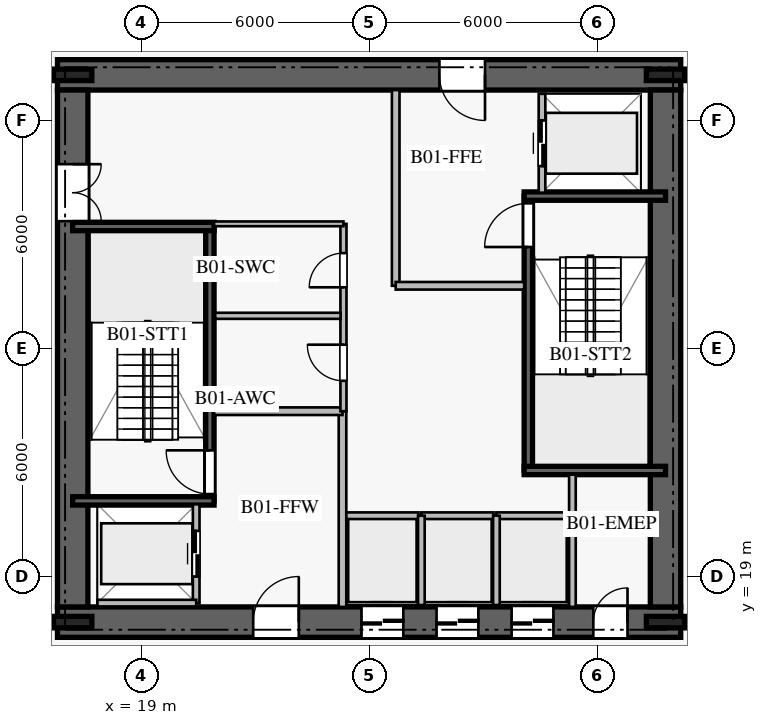
"""IFC4 building model, lengths in metres.
Left out: names, types, materials, properties, quantities, classifications, styles, units other than length and angle.
Written with IfcOpenShell. Run it as: python <this file> out.ifc"""

import sys

from ifc_helpers import new_model, si_unit, direction, frame, frame_2d, origin, origin_2d, place, context, subcontext, project, spatial, rectangle, i_section, extrude, element, fill, save


model = new_model("IFC4")
c1 = context("Model", 3, precision=1e-05, world=origin(), true_north=direction((0.0, 1.0)))
c2 = subcontext(c1, "Body", "Model", "MODEL_VIEW")
j1 = project(units=[si_unit("LENGTHUNIT", "METRE"), si_unit("PLANEANGLEUNIT", "RADIAN")], contexts=[c1])
p1 = place(None, origin())
s1 = spatial("IfcSite", under=j1, at=p1, CompositionType="ELEMENT")
p2 = place(p1, origin())
s2 = spatial("IfcBuilding", under=s1, at=p2, CompositionType="ELEMENT")
p3 = place(p2, frame((0.0, 0.0, -4.2)))
s3 = spatial("IfcBuildingStorey", under=s2, at=p3, CompositionType="ELEMENT", Elevation=-4.2)
p4 = place(p3, frame((16.8, 17.8, 0.0), z_axis=(0.0, 0.0, 1.0), x_axis=(1.0, 0.0, 0.0)))
e1 = element("IfcWall", 1, at=p4, inside=s3, PredefinedType="SHEAR", context=c2, shape_type="SweptSolid", body=[
    extrude(rectangle(XDim=16.4, YDim=0.8, at=frame_2d((8.2, 0.0))), origin(), (0.0, 0.0, 1.0), 3.88),
])
p5 = place(p4, frame((5.15, 0.0, 0.0)))
e2 = element("IfcOpeningElement", 2, at=p5, cuts=e1, PredefinedType="OPENING", context=c2, shape_type="SweptSolid", body=[
    extrude(rectangle(XDim=1.2, YDim=2.25, at=frame_2d((0.6, 1.125))), frame((0.0, 0.41, 0.0), z_axis=(0.0, -1.0, 0.0), x_axis=(1.0, 0.0, 0.0)), (0.0, 0.0, 1.0), 0.82),
])
p6 = place(p4, frame((14.1, 0.0, 0.0)))
e3 = element("IfcOpeningElement", 3, at=p6, cuts=e1, PredefinedType="OPENING", context=c2, shape_type="SweptSolid", body=[
    extrude(rectangle(XDim=0.9, YDim=2.1, at=frame_2d((0.45, 1.05))), frame((0.0, 0.41, 0.0), z_axis=(0.0, -1.0, 0.0), x_axis=(1.0, 0.0, 0.0)), (0.0, 0.0, 1.0), 0.82),
])
p7 = place(p4, frame((8.0, 0.0, 0.0)))
e4 = element("IfcOpeningElement", 4, at=p7, cuts=e1, PredefinedType="OPENING", context=c2, shape_type="SweptSolid", body=[
    extrude(rectangle(XDim=1.1, YDim=2.2, at=frame_2d((0.55, 1.1))), frame((0.0, 0.41, 0.0), z_axis=(0.0, -1.0, 0.0), x_axis=(1.0, 0.0, 0.0)), (0.0, 0.0, 1.0), 0.82),
])
p8 = place(p4, frame((9.975, 0.0, 0.0)))
e5 = element("IfcOpeningElement", 5, at=p8, cuts=e1, PredefinedType="OPENING", context=c2, shape_type="SweptSolid", body=[
    extrude(rectangle(XDim=1.1, YDim=2.2, at=frame_2d((0.55, 1.1))), frame((0.0, 0.41, 0.0), z_axis=(0.0, -1.0, 0.0), x_axis=(1.0, 0.0, 0.0)), (0.0, 0.0, 1.0), 0.82),
])
p9 = place(p4, frame((11.95, 0.0, 0.0)))
e6 = element("IfcOpeningElement", 6, at=p9, cuts=e1, PredefinedType="OPENING", context=c2, shape_type="SweptSolid", body=[
    extrude(rectangle(XDim=1.1, YDim=2.2, at=frame_2d((0.55, 1.1))), frame((0.0, 0.41, 0.0), z_axis=(0.0, -1.0, 0.0), x_axis=(1.0, 0.0, 0.0)), (0.0, 0.0, 1.0), 0.82),
])
p10 = place(p3, frame((33.2, 32.2, 0.0), z_axis=(0.0, 0.0, 1.0), x_axis=(-1.0, 0.0, 0.0)))
e7 = element("IfcWall", 7, at=p10, inside=s3, PredefinedType="SHEAR", context=c2, shape_type="SweptSolid", body=[
    extrude(rectangle(XDim=16.4, YDim=0.8, at=frame_2d((8.2, 0.0))), origin(), (0.0, 0.0, 1.0), 3.88),
])
p11 = place(p10, frame((5.15, 0.0, 0.0)))
e8 = element("IfcOpeningElement", 8, at=p11, cuts=e7, PredefinedType="OPENING", context=c2, shape_type="SweptSolid", body=[
    extrude(rectangle(XDim=1.2, YDim=2.25, at=frame_2d((0.6, 1.125))), frame((0.0, 0.41, 0.0), z_axis=(0.0, -1.0, 0.0), x_axis=(1.0, 0.0, 0.0)), (0.0, 0.0, 1.0), 0.82),
])
p12 = place(p3, frame((17.2, 31.8, 0.0), z_axis=(0.0, 0.0, 1.0), x_axis=(0.0, -1.0, 0.0)))
e9 = element("IfcWall", 9, at=p12, inside=s3, PredefinedType="SHEAR", context=c2, shape_type="SweptSolid", body=[
    extrude(rectangle(XDim=13.6, YDim=0.8, at=frame_2d((6.8, 0.0))), origin(), (0.0, 0.0, 1.0), 3.88),
])
p13 = place(p12, frame((1.95, 0.0, 0.0)))
e10 = element("IfcOpeningElement", 10, at=p13, cuts=e9, PredefinedType="OPENING", context=c2, shape_type="SweptSolid", body=[
    extrude(rectangle(XDim=1.5, YDim=2.2, at=frame_2d((0.75, 1.1))), frame((0.0, 0.41, 0.0), z_axis=(0.0, -1.0, 0.0), x_axis=(1.0, 0.0, 0.0)), (0.0, 0.0, 1.0), 0.82),
])
p14 = place(p3, frame((32.8, 18.2, 0.0), z_axis=(0.0, 0.0, 1.0), x_axis=(0.0, 1.0, 0.0)))
e11 = element("IfcWall", 11, at=p14, inside=s3, PredefinedType="SHEAR", context=c2, shape_type="SweptSolid", body=[
    extrude(rectangle(XDim=13.6, YDim=0.8, at=frame_2d((6.8, 0.0))), origin(), (0.0, 0.0, 1.0), 3.88),
])
for number, where, z_axis, x_axis in (
    (12, (17.2, 17.8, 0.0), (0.0, 0.0, 1.0), (1.0, 0.0, 0.0)),
    (13, (32.8, 17.8, 0.0), (0.0, 0.0, 1.0), (1.0, 0.0, 0.0)),
    (14, (32.8, 32.2, 0.0), (0.0, 0.0, 1.0), (1.0, 0.0, 0.0)),
    (15, (17.2, 32.2, 0.0), (0.0, 0.0, 1.0), (1.0, 0.0, 0.0)),
):
    element("IfcColumn", number, at=place(p3, frame(where, z_axis=z_axis, x_axis=x_axis)), inside=s3, PredefinedType="COLUMN", context=c2, shape_type="SweptSolid", body=[
        extrude(i_section(OverallWidth=0.302, OverallDepth=1.008, WebThickness=0.021, FlangeThickness=0.04, at=origin_2d()), origin(), (0.0, 0.0, 1.0), 4.2),
    ])
p15 = place(p3, frame((20.81, 20.99, 0.0), z_axis=(0.0, 0.0, 1.0), x_axis=(0.0, 1.0, 0.0)))
e16 = element("IfcWall", 16, at=p15, inside=s3, PredefinedType="SOLIDWALL", context=c2, shape_type="SweptSolid", body=[
    extrude(rectangle(XDim=7.22, YDim=0.22, at=frame_2d((3.61, 0.0))), origin(), (0.0, 0.0, 1.0), 3.88),
])
p16 = place(p15, frame((0.18, 0.0, 0.0)))
e17 = element("IfcOpeningElement", 17, at=p16, cuts=e16, PredefinedType="OPENING", context=c2, shape_type="SweptSolid", body=[
    extrude(rectangle(XDim=1.15, YDim=2.2, at=frame_2d((0.575, 1.1))), frame((0.0, 0.12, 0.0), z_axis=(0.0, -1.0, 0.0), x_axis=(1.0, 0.0, 0.0)), (0.0, 0.0, 1.0), 0.24),
])
for number, where, z_axis, x_axis in (
    (18, (17.2, 20.99, 0.0), (0.0, 0.0, 1.0), (1.0, 0.0, 0.0)),
    (19, (17.2, 28.21, 0.0), (0.0, 0.0, 1.0), (1.0, 0.0, 0.0)),
):
    element("IfcWall", number, at=place(p3, frame(where, z_axis=z_axis, x_axis=x_axis)), inside=s3, PredefinedType="SOLIDWALL", context=c2, shape_type="SweptSolid", body=[
        extrude(rectangle(XDim=3.72, YDim=0.22, at=frame_2d((1.86, 0.0))), origin(), (0.0, 0.0, 1.0), 3.88),
    ])
p17 = place(p3, frame((29.19, 21.79, 0.0), z_axis=(0.0, 0.0, 1.0), x_axis=(0.0, 1.0, 0.0)))
e20 = element("IfcWall", 20, at=p17, inside=s3, PredefinedType="SOLIDWALL", context=c2, shape_type="SweptSolid", body=[
    extrude(rectangle(XDim=7.22, YDim=0.22, at=frame_2d((3.61, 0.0))), origin(), (0.0, 0.0, 1.0), 3.88),
])
p18 = place(p17, frame((5.88, 0.0, 0.0)))
e21 = element("IfcOpeningElement", 21, at=p18, cuts=e20, PredefinedType="OPENING", context=c2, shape_type="SweptSolid", body=[
    extrude(rectangle(XDim=1.15, YDim=2.2, at=frame_2d((0.575, 1.1))), frame((0.0, 0.12, 0.0), z_axis=(0.0, -1.0, 0.0), x_axis=(1.0, 0.0, 0.0)), (0.0, 0.0, 1.0), 0.24),
])
for number, where, z_axis, x_axis in (
    (22, (29.08, 21.79, 0.0), (0.0, 0.0, 1.0), (1.0, 0.0, 0.0)),
    (23, (29.08, 29.01, 0.0), (0.0, 0.0, 1.0), (1.0, 0.0, 0.0)),
):
    element("IfcWall", number, at=place(p3, frame(where, z_axis=z_axis, x_axis=x_axis)), inside=s3, PredefinedType="SOLIDWALL", context=c2, shape_type="SweptSolid", body=[
        extrude(rectangle(XDim=3.72, YDim=0.22, at=frame_2d((1.86, 0.0))), origin(), (0.0, 0.0, 1.0), 3.88),
    ])
p19 = place(p3, frame((24.3, 18.2, 0.0), z_axis=(0.0, 0.0, 1.0), x_axis=(0.0, 1.0, 0.0)))
e24 = element("IfcWall", 24, at=p19, inside=s3, PredefinedType="PARTITIONING", context=c2, shape_type="SweptSolid", body=[
    extrude(rectangle(XDim=5.15, YDim=0.2, at=frame_2d((2.575, 0.0))), origin(), (0.0, 0.0, 1.0), 3.88),
])
p20 = place(p3, frame((20.92, 23.35, 0.0), z_axis=(0.0, 0.0, 1.0), x_axis=(1.0, 0.0, 0.0)))
e25 = element("IfcWall", 25, at=p20, inside=s3, PredefinedType="PARTITIONING", context=c2, shape_type="SweptSolid", body=[
    extrude(rectangle(XDim=3.38, YDim=0.2, at=frame_2d((1.69, 0.0))), origin(), (0.0, 0.0, 1.0), 3.88),
])
p21 = place(p3, frame((25.7, 26.65, 0.0), z_axis=(0.0, 0.0, 1.0), x_axis=(0.0, 1.0, 0.0)))
e26 = element("IfcWall", 26, at=p21, inside=s3, PredefinedType="PARTITIONING", context=c2, shape_type="SweptSolid", body=[
    extrude(rectangle(XDim=5.15, YDim=0.2, at=frame_2d((2.575, 0.0))), origin(), (0.0, 0.0, 1.0), 3.88),
])
p22 = place(p3, frame((25.7, 26.65, 0.0), z_axis=(0.0, 0.0, 1.0), x_axis=(1.0, 0.0, 0.0)))
e27 = element("IfcWall", 27, at=p22, inside=s3, PredefinedType="PARTITIONING", context=c2, shape_type="SweptSolid", body=[
    extrude(rectangle(XDim=3.38, YDim=0.2, at=frame_2d((1.69, 0.0))), origin(), (0.0, 0.0, 1.0), 3.88),
])
p23 = place(p3, frame((24.325, 23.35, 0.0), z_axis=(0.0, 0.0, 1.0), x_axis=(0.0, 1.0, 0.0)))
e28 = element("IfcWall", 28, at=p23, inside=s3, PredefinedType="PLUMBINGWALL", context=c2, shape_type="SweptSolid", body=[
    extrude(rectangle(XDim=4.93, YDim=0.16, at=frame_2d((2.465, 0.0))), origin(), (0.0, 0.0, 1.0), 3.88),
])
p24 = place(p23, frame((0.8, 0.0, 0.0)))
e29 = element("IfcOpeningElement", 29, at=p24, cuts=e28, PredefinedType="OPENING", context=c2, shape_type="SweptSolid", body=[
    extrude(rectangle(XDim=0.95, YDim=2.1, at=frame_2d((0.475, 1.05))), frame((0.0, 0.09, 0.0), z_axis=(0.0, -1.0, 0.0), x_axis=(1.0, 0.0, 0.0)), (0.0, 0.0, 1.0), 0.18),
])
p25 = place(p23, frame((3.26, 0.0, 0.0)))
e30 = element("IfcOpeningElement", 30, at=p25, cuts=e28, PredefinedType="OPENING", context=c2, shape_type="SweptSolid", body=[
    extrude(rectangle(XDim=0.9, YDim=2.1, at=frame_2d((0.45, 1.05))), frame((0.0, 0.09, 0.0), z_axis=(0.0, -1.0, 0.0), x_axis=(1.0, 0.0, 0.0)), (0.0, 0.0, 1.0), 0.18),
])
p26 = place(p3, frame((20.92, 28.28, 0.0), z_axis=(0.0, 0.0, 1.0), x_axis=(1.0, 0.0, 0.0)))
e31 = element("IfcWall", 31, at=p26, inside=s3, PredefinedType="PARTITIONING", context=c2, shape_type="SweptSolid", body=[
    extrude(rectangle(XDim=3.405, YDim=0.125, at=frame_2d((1.703, 0.0))), origin(), (0.0, 0.0, 1.0), 3.88),
])
p27 = place(p3, frame((20.95, 25.86, 0.0), z_axis=(0.0, 0.0, 1.0), x_axis=(1.0, 0.0, 0.0)))
e32 = element("IfcWall", 32, at=p27, inside=s3, PredefinedType="PLUMBINGWALL", context=c2, shape_type="SweptSolid", body=[
    extrude(rectangle(XDim=3.3, YDim=0.16, at=frame_2d((1.65, 0.0))), origin(), (0.0, 0.0, 1.0), 3.88),
])
p28 = place(p3, frame((30.35, 18.2, 0.0), z_axis=(0.0, 0.0, 1.0), x_axis=(0.0, 1.0, 0.0)))
e33 = element("IfcWall", 33, at=p28, inside=s3, PredefinedType="PARTITIONING", context=c2, shape_type="SweptSolid", body=[
    extrude(rectangle(XDim=3.48, YDim=0.175, at=frame_2d((1.74, 0.0))), origin(), (0.0, 0.0, 1.0), 3.88),
])
p29 = place(p3, frame((24.4, 20.6, 0.0), z_axis=(0.0, 0.0, 1.0), x_axis=(1.0, 0.0, 0.0)))
e34 = element("IfcWall", 34, at=p29, inside=s3, PredefinedType="PARTITIONING", context=c2, shape_type="SweptSolid", body=[
    extrude(rectangle(XDim=1.9, YDim=0.175, at=frame_2d((0.95, 0.0))), origin(), (0.0, 0.0, 1.0), 3.88),
])
p30 = place(p3, frame((26.375, 20.6, 0.0), z_axis=(0.0, 0.0, 1.0), x_axis=(1.0, 0.0, 0.0)))
e35 = element("IfcWall", 35, at=p30, inside=s3, PredefinedType="PARTITIONING", context=c2, shape_type="SweptSolid", body=[
    extrude(rectangle(XDim=1.9, YDim=0.175, at=frame_2d((0.95, 0.0))), origin(), (0.0, 0.0, 1.0), 3.88),
])
p31 = place(p3, frame((26.375, 18.25, 0.0), z_axis=(0.0, 0.0, 1.0), x_axis=(0.0, 1.0, 0.0)))
e36 = element("IfcWall", 36, at=p31, inside=s3, PredefinedType="PARTITIONING", context=c2, shape_type="SweptSolid", body=[
    extrude(rectangle(XDim=2.35, YDim=0.175, at=frame_2d((1.175, 0.0))), origin(), (0.0, 0.0, 1.0), 3.88),
])
p32 = place(p3, frame((28.35, 20.6, 0.0), z_axis=(0.0, 0.0, 1.0), x_axis=(1.0, 0.0, 0.0)))
e37 = element("IfcWall", 37, at=p32, inside=s3, PredefinedType="PARTITIONING", context=c2, shape_type="SweptSolid", body=[
    extrude(rectangle(XDim=1.9, YDim=0.175, at=frame_2d((0.95, 0.0))), origin(), (0.0, 0.0, 1.0), 3.88),
])
p33 = place(p3, frame((28.35, 18.25, 0.0), z_axis=(0.0, 0.0, 1.0), x_axis=(0.0, 1.0, 0.0)))
e38 = element("IfcWall", 38, at=p33, inside=s3, PredefinedType="PARTITIONING", context=c2, shape_type="SweptSolid", body=[
    extrude(rectangle(XDim=2.35, YDim=0.175, at=frame_2d((1.175, 0.0))), origin(), (0.0, 0.0, 1.0), 3.88),
])
p34 = place(p3, frame((20.45, 18.3, 0.0), z_axis=(0.0, 0.0, 1.0), x_axis=(0.0, 1.0, 0.0)))
e39 = element("IfcWall", 39, at=p34, inside=s3, PredefinedType="PARTITIONING", context=c2, shape_type="SweptSolid", body=[
    extrude(rectangle(XDim=2.6, YDim=0.175, at=frame_2d((1.3, 0.0))), origin(), (0.0, 0.0, 1.0), 3.88),
])
p35 = place(p34, frame((0.7, 0.0, 0.0)))
e40 = element("IfcOpeningElement", 40, at=p35, cuts=e39, PredefinedType="OPENING", context=c2, shape_type="SweptSolid", body=[
    extrude(rectangle(XDim=1.2, YDim=2.2, at=frame_2d((0.6, 1.1))), frame((0.0, 0.098, 0.0), z_axis=(0.0, -1.0, 0.0), x_axis=(1.0, 0.0, 0.0)), (0.0, 0.0, 1.0), 0.195),
])
p36 = place(p3, frame((17.85, 18.3, 0.0), z_axis=(0.0, 0.0, 1.0), x_axis=(1.0, 0.0, 0.0)))
e41 = element("IfcWall", 41, at=p36, inside=s3, PredefinedType="PARTITIONING", context=c2, shape_type="SweptSolid", body=[
    extrude(rectangle(XDim=2.6, YDim=0.175, at=frame_2d((1.3, 0.0))), origin(), (0.0, 0.0, 1.0), 3.88),
])
p37 = place(p3, frame((29.55, 29.1, 0.0), z_axis=(0.0, 0.0, 1.0), x_axis=(0.0, 1.0, 0.0)))
e42 = element("IfcWall", 42, at=p37, inside=s3, PredefinedType="PARTITIONING", context=c2, shape_type="SweptSolid", body=[
    extrude(rectangle(XDim=2.6, YDim=0.175, at=frame_2d((1.3, 0.0))), origin(), (0.0, 0.0, 1.0), 3.88),
])
p38 = place(p37, frame((0.7, 0.0, 0.0)))
e43 = element("IfcOpeningElement", 43, at=p38, cuts=e42, PredefinedType="OPENING", context=c2, shape_type="SweptSolid", body=[
    extrude(rectangle(XDim=1.2, YDim=2.2, at=frame_2d((0.6, 1.1))), frame((0.0, 0.098, 0.0), z_axis=(0.0, -1.0, 0.0), x_axis=(1.0, 0.0, 0.0)), (0.0, 0.0, 1.0), 0.195),
])
p39 = place(p16, origin())
e44 = element("IfcDoor", 44, at=p39, inside=s3, OperationType="SINGLE_SWING_RIGHT", PredefinedType="DOOR", context=c2, shape_type="SweptSolid", body=[
    extrude(rectangle(XDim=1.15, YDim=2.2, at=frame_2d((0.575, 1.1))), frame((0.0, 0.025, 0.0), z_axis=(0.0, -1.0, 0.0), x_axis=(1.0, 0.0, 0.0)), (0.0, 0.0, 1.0), 0.05),
])
fill(e17, e44)
p40 = place(p18, origin())
e45 = element("IfcDoor", 45, at=p40, inside=s3, OperationType="SINGLE_SWING_LEFT", PredefinedType="DOOR", context=c2, shape_type="SweptSolid", body=[
    extrude(rectangle(XDim=1.15, YDim=2.2, at=frame_2d((0.575, 1.1))), frame((0.0, 0.025, 0.0), z_axis=(0.0, -1.0, 0.0), x_axis=(1.0, 0.0, 0.0)), (0.0, 0.0, 1.0), 0.05),
])
fill(e21, e45)
p41 = place(p5, origin())
e46 = element("IfcDoor", 46, at=p41, inside=s3, OperationType="SINGLE_SWING_RIGHT", PredefinedType="DOOR", context=c2, shape_type="SweptSolid", body=[
    extrude(rectangle(XDim=1.2, YDim=2.25, at=frame_2d((0.6, 1.125))), frame((0.0, 0.025, 0.0), z_axis=(0.0, -1.0, 0.0), x_axis=(1.0, 0.0, 0.0)), (0.0, 0.0, 1.0), 0.05),
])
fill(e2, e46)
p42 = place(p11, origin())
e47 = element("IfcDoor", 47, at=p42, inside=s3, OperationType="SINGLE_SWING_LEFT", PredefinedType="DOOR", context=c2, shape_type="SweptSolid", body=[
    extrude(rectangle(XDim=1.2, YDim=2.25, at=frame_2d((0.6, 1.125))), frame((0.0, 0.025, 0.0), z_axis=(0.0, -1.0, 0.0), x_axis=(1.0, 0.0, 0.0)), (0.0, 0.0, 1.0), 0.05),
])
fill(e8, e47)
p43 = place(p13, origin())
e48 = element("IfcDoor", 48, at=p43, inside=s3, OperationType="DOUBLE_DOOR_SINGLE_SWING", PredefinedType="DOOR", context=c2, shape_type="SweptSolid", body=[
    extrude(rectangle(XDim=1.5, YDim=2.2, at=frame_2d((0.75, 1.1))), frame((0.0, 0.025, 0.0), z_axis=(0.0, -1.0, 0.0), x_axis=(1.0, 0.0, 0.0)), (0.0, 0.0, 1.0), 0.05),
])
fill(e10, e48)
p44 = place(p24, origin())
e49 = element("IfcDoor", 49, at=p44, inside=s3, OperationType="SINGLE_SWING_RIGHT", PredefinedType="DOOR", context=c2, shape_type="SweptSolid", body=[
    extrude(rectangle(XDim=0.95, YDim=2.1, at=frame_2d((0.475, 1.05))), frame((0.0, 0.025, 0.0), z_axis=(0.0, -1.0, 0.0), x_axis=(1.0, 0.0, 0.0)), (0.0, 0.0, 1.0), 0.05),
])
fill(e29, e49)
p45 = place(p25, origin())
e50 = element("IfcDoor", 50, at=p45, inside=s3, OperationType="SINGLE_SWING_LEFT", PredefinedType="DOOR", context=c2, shape_type="SweptSolid", body=[
    extrude(rectangle(XDim=0.9, YDim=2.1, at=frame_2d((0.45, 1.05))), frame((0.0, 0.025, 0.0), z_axis=(0.0, -1.0, 0.0), x_axis=(1.0, 0.0, 0.0)), (0.0, 0.0, 1.0), 0.05),
])
fill(e30, e50)
p46 = place(p6, origin())
e51 = element("IfcDoor", 51, at=p46, inside=s3, OperationType="SINGLE_SWING_RIGHT", PredefinedType="DOOR", context=c2, shape_type="SweptSolid", body=[
    extrude(rectangle(XDim=0.9, YDim=2.1, at=frame_2d((0.45, 1.05))), frame((0.0, 0.025, 0.0), z_axis=(0.0, -1.0, 0.0), x_axis=(1.0, 0.0, 0.0)), (0.0, 0.0, 1.0), 0.05),
])
fill(e3, e51)
p47 = place(p7, origin())
e52 = element("IfcDoor", 52, at=p47, inside=s3, OperationType="DOUBLE_DOOR_SLIDING", PredefinedType="DOOR", context=c2, shape_type="SweptSolid", body=[
    extrude(rectangle(XDim=1.1, YDim=2.2, at=frame_2d((0.55, 1.1))), frame((0.0, 0.025, 0.0), z_axis=(0.0, -1.0, 0.0), x_axis=(1.0, 0.0, 0.0)), (0.0, 0.0, 1.0), 0.05),
])
fill(e4, e52)
p48 = place(p8, origin())
e53 = element("IfcDoor", 53, at=p48, inside=s3, OperationType="DOUBLE_DOOR_SLIDING", PredefinedType="DOOR", context=c2, shape_type="SweptSolid", body=[
    extrude(rectangle(XDim=1.1, YDim=2.2, at=frame_2d((0.55, 1.1))), frame((0.0, 0.025, 0.0), z_axis=(0.0, -1.0, 0.0), x_axis=(1.0, 0.0, 0.0)), (0.0, 0.0, 1.0), 0.05),
])
fill(e5, e53)
p49 = place(p9, origin())
e54 = element("IfcDoor", 54, at=p49, inside=s3, OperationType="DOUBLE_DOOR_SLIDING", PredefinedType="DOOR", context=c2, shape_type="SweptSolid", body=[
    extrude(rectangle(XDim=1.1, YDim=2.2, at=frame_2d((0.55, 1.1))), frame((0.0, 0.025, 0.0), z_axis=(0.0, -1.0, 0.0), x_axis=(1.0, 0.0, 0.0)), (0.0, 0.0, 1.0), 0.05),
])
fill(e6, e54)
p50 = place(p35, origin())
e55 = element("IfcDoor", 55, at=p50, inside=s3, OperationType="DOUBLE_DOOR_SLIDING", PredefinedType="DOOR", context=c2, shape_type="SweptSolid", body=[
    extrude(rectangle(XDim=1.2, YDim=2.2, at=frame_2d((0.6, 1.1))), frame((0.0, 0.025, 0.0), z_axis=(0.0, -1.0, 0.0), x_axis=(1.0, 0.0, 0.0)), (0.0, 0.0, 1.0), 0.05),
])
fill(e40, e55)
p51 = place(p38, origin())
e56 = element("IfcDoor", 56, at=p51, inside=s3, OperationType="DOUBLE_DOOR_SLIDING", PredefinedType="DOOR", context=c2, shape_type="SweptSolid", body=[
    extrude(rectangle(XDim=1.2, YDim=2.2, at=frame_2d((0.6, 1.1))), frame((0.0, 0.025, 0.0), z_axis=(0.0, -1.0, 0.0), x_axis=(1.0, 0.0, 0.0)), (0.0, 0.0, 1.0), 0.05),
])
fill(e43, e56)
save(model, sys.argv[1])
